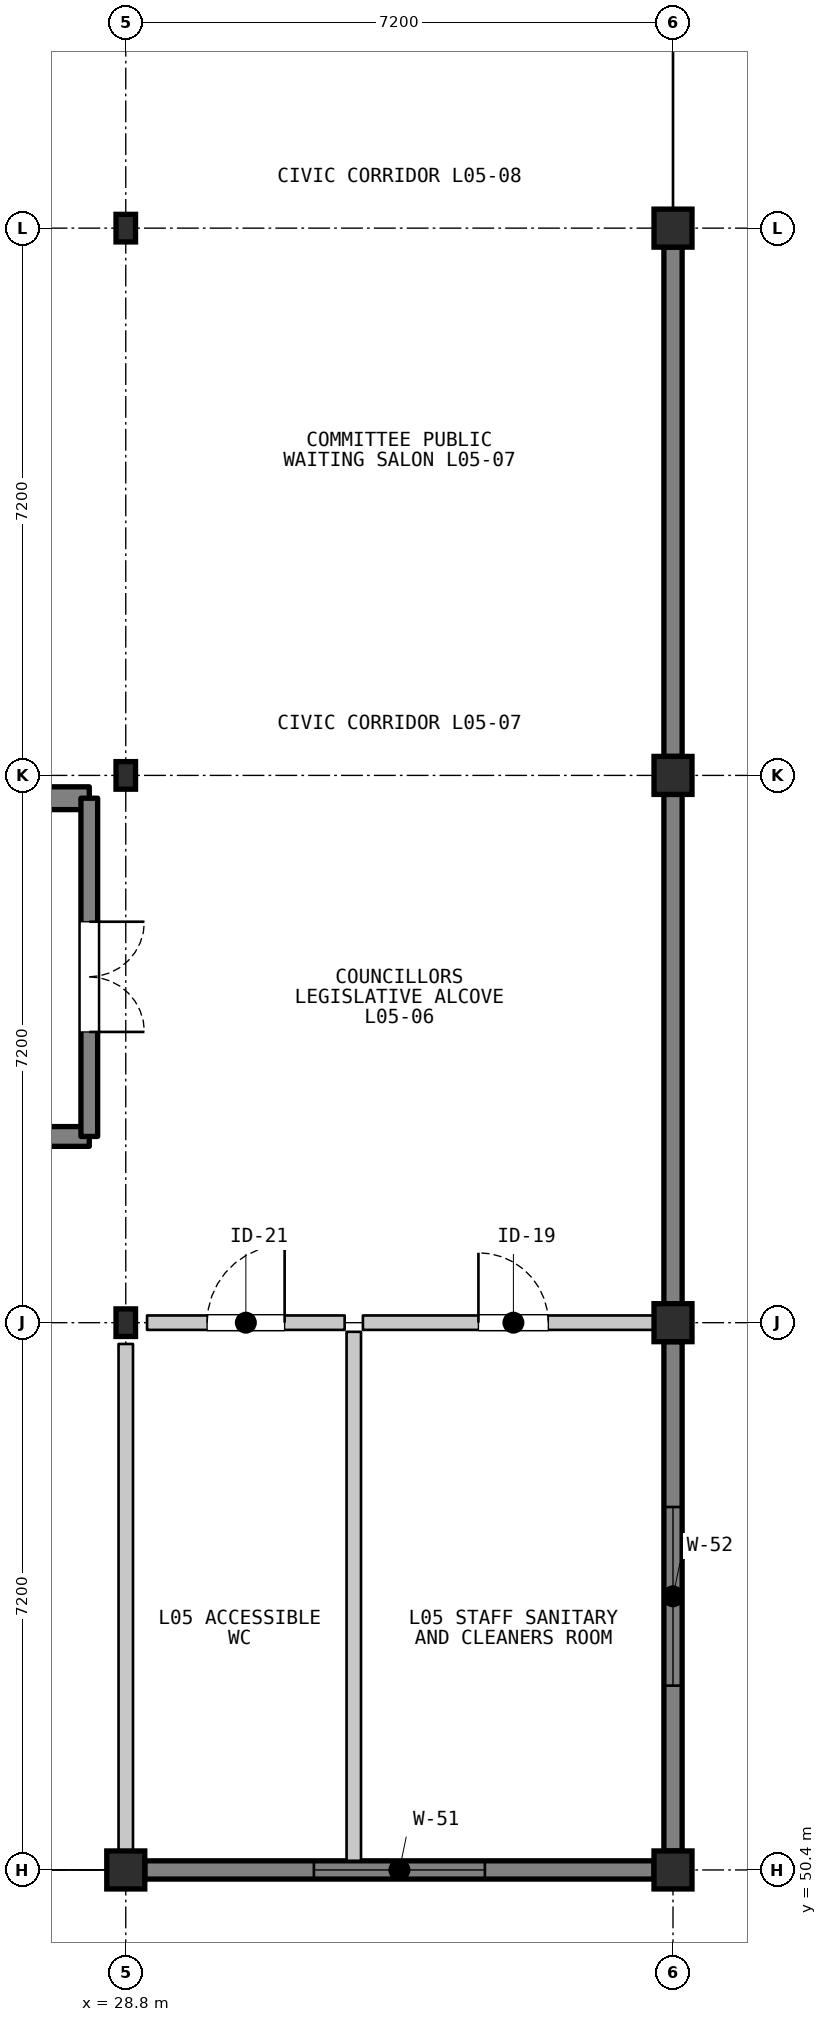
"""IFC4 building model, lengths in metres.
Left out: names, types, materials, properties, quantities, classifications, styles, units other than length and angle.
Written with IfcOpenShell. Run it as: python <this file> out.ifc"""

import sys

from ifc_helpers import new_model, si_unit, direction, frame, frame_2d, origin, origin_2d, place, context, subcontext, project, spatial, rectangle, i_section, extrude, element, fill, save


model = new_model("IFC4")
c1 = context("Model", 3, precision=1e-05, world=origin(), true_north=direction((0.0, 1.0)))
c2 = subcontext(c1, "Body", "Model", "MODEL_VIEW")
j1 = project(units=[si_unit("LENGTHUNIT", "METRE"), si_unit("PLANEANGLEUNIT", "RADIAN")], contexts=[c1])
p1 = place(None, origin())
s1 = spatial("IfcSite", under=j1, at=p1, CompositionType="ELEMENT")
p2 = place(p1, origin())
s2 = spatial("IfcBuilding", under=s1, at=p2, CompositionType="ELEMENT")
p3 = place(p2, frame((0.0, 0.0, 18.0)))
s3 = spatial("IfcBuildingStorey", under=s2, at=p3, CompositionType="ELEMENT", Elevation=18.0)
p4 = place(p3, frame((28.8, 50.4, 0.0), z_axis=(0.0, 0.0, 1.0), x_axis=(1.0, 0.0, 0.0)))
e1 = element("IfcColumn", 1, at=p4, inside=s3, PredefinedType="COLUMN", context=c2, shape_type="SweptSolid", body=[
    extrude(rectangle(XDim=0.5, YDim=0.5, at=origin_2d()), origin(), (0.0, 0.0, 1.0), 3.9),
])
for number, where, z_axis, x_axis in (
    (2, (28.8, 57.6, 0.0), (0.0, 0.0, 1.0), (1.0, 0.0, 0.0)),
    (3, (28.8, 64.8, 0.0), (0.0, 0.0, 1.0), (1.0, 0.0, 0.0)),
    (4, (28.8, 72.0, 0.0), (0.0, 0.0, 1.0), (1.0, 0.0, 0.0)),
):
    element("IfcColumn", number, at=place(p3, frame(where, z_axis=z_axis, x_axis=x_axis)), inside=s3, PredefinedType="COLUMN", context=c2, shape_type="SweptSolid", body=[
        extrude(i_section(OverallWidth=0.257, OverallDepth=0.363, WebThickness=0.013, FlangeThickness=0.022, FilletRadius=0.015, at=origin_2d()), origin(), (0.0, 0.0, 1.0), 3.9),
    ])
for number, where, z_axis, x_axis in (
    (5, (36.0, 50.4, 0.0), (0.0, 0.0, 1.0), (1.0, 0.0, 0.0)),
    (6, (36.0, 57.6, 0.0), (0.0, 0.0, 1.0), (1.0, 0.0, 0.0)),
    (7, (36.0, 64.8, 0.0), (0.0, 0.0, 1.0), (1.0, 0.0, 0.0)),
    (8, (36.0, 72.0, 0.0), (0.0, 0.0, 1.0), (1.0, 0.0, 0.0)),
):
    element("IfcColumn", number, at=place(p3, frame(where, z_axis=z_axis, x_axis=x_axis)), inside=s3, PredefinedType="COLUMN", context=c2, shape_type="SweptSolid", body=[
        extrude(rectangle(XDim=0.5, YDim=0.5, at=origin_2d()), origin(), (0.0, 0.0, 1.0), 3.9),
    ])
p5 = place(p3, frame((35.75, 50.4, 0.0), z_axis=(0.0, 0.0, 1.0), x_axis=(-1.0, 0.0, 0.0)))
e9 = element("IfcWall", 9, at=p5, inside=s3, PredefinedType="SOLIDWALL", context=c2, shape_type="SweptSolid", body=[
    extrude(rectangle(XDim=6.7, YDim=0.24, at=frame_2d((3.35, 0.0))), origin(), (0.0, 0.0, 1.0), 3.172),
])
p6 = place(p5, frame((2.225, 0.0, 0.95)))
e10 = element("IfcOpeningElement", 10, at=p6, cuts=e9, PredefinedType="OPENING", context=c2, shape_type="SweptSolid", body=[
    extrude(rectangle(XDim=2.25, YDim=1.65, at=frame_2d((1.125, 0.825))), frame((0.0, 0.13, 0.0), z_axis=(0.0, -1.0, 0.0), x_axis=(1.0, 0.0, 0.0)), (0.0, 0.0, 1.0), 0.26),
])
p7 = place(p3, frame((36.0, 57.35, 0.0), z_axis=(0.0, 0.0, 1.0), x_axis=(0.0, -1.0, 0.0)))
e11 = element("IfcWall", 11, at=p7, inside=s3, PredefinedType="SOLIDWALL", context=c2, shape_type="SweptSolid", body=[
    extrude(rectangle(XDim=6.7, YDim=0.24, at=frame_2d((3.35, 0.0))), origin(), (0.0, 0.0, 1.0), 3.172),
])
p8 = place(p7, frame((2.175, 0.0, 0.95)))
e12 = element("IfcOpeningElement", 12, at=p8, cuts=e11, PredefinedType="OPENING", context=c2, shape_type="SweptSolid", body=[
    extrude(rectangle(XDim=2.35, YDim=1.65, at=frame_2d((1.175, 0.825))), frame((0.0, 0.13, 0.0), z_axis=(0.0, -1.0, 0.0), x_axis=(1.0, 0.0, 0.0)), (0.0, 0.0, 1.0), 0.26),
])
for number, where, z_axis, x_axis in (
    (13, (36.0, 64.55, 0.0), (0.0, 0.0, 1.0), (0.0, -1.0, 0.0)),
    (14, (36.0, 71.75, 0.0), (0.0, 0.0, 1.0), (0.0, -1.0, 0.0)),
):
    element("IfcWall", number, at=place(p3, frame(where, z_axis=z_axis, x_axis=x_axis)), inside=s3, PredefinedType="SOLIDWALL", context=c2, shape_type="SweptSolid", body=[
        extrude(rectangle(XDim=6.7, YDim=0.24, at=frame_2d((3.35, 0.0))), origin(), (0.0, 0.0, 1.0), 3.172),
    ])
p9 = place(p3, frame((22.91, 60.05, 0.0), z_axis=(0.0, 0.0, 1.0), x_axis=(1.0, 0.0, 0.0)))
e15 = element("IfcWall", 15, at=p9, inside=s3, PredefinedType="SHEAR", context=c2, shape_type="SweptSolid", body=[
    extrude(rectangle(XDim=5.41, YDim=0.26, at=frame_2d((2.705, 0.0))), origin(), (0.0, 0.0, 1.0), 3.72),
])
p10 = place(p9, frame((2.84, 0.0, 0.0)))
e16 = element("IfcOpeningElement", 16, at=p10, cuts=e15, PredefinedType="OPENING", context=c2, shape_type="SweptSolid", body=[
    extrude(rectangle(XDim=1.15, YDim=2.15, at=frame_2d((0.575, 1.075))), frame((0.0, 0.14, 0.0), z_axis=(0.0, -1.0, 0.0), x_axis=(1.0, 0.0, 0.0)), (0.0, 0.0, 1.0), 0.28),
])
p11 = place(p3, frame((22.4, 64.5, 0.0), z_axis=(0.0, 0.0, 1.0), x_axis=(1.0, 0.0, 0.0)))
e17 = element("IfcWall", 17, at=p11, inside=s3, PredefinedType="SHEAR", context=c2, shape_type="SweptSolid", body=[
    extrude(rectangle(XDim=5.92, YDim=0.3, at=frame_2d((2.96, 0.0))), origin(), (0.0, 0.0, 1.0), 3.72),
])
p12 = place(p3, frame((28.32, 64.5, 0.0), z_axis=(0.0, 0.0, 1.0), x_axis=(0.0, -1.0, 0.0)))
e18 = element("IfcWall", 18, at=p12, inside=s3, PredefinedType="SHEAR", context=c2, shape_type="SweptSolid", body=[
    extrude(rectangle(XDim=4.45, YDim=0.22, at=frame_2d((2.225, 0.0))), origin(), (0.0, 0.0, 1.0), 3.72),
])
p13 = place(p12, frame((1.625, 0.0, 0.0)))
e19 = element("IfcOpeningElement", 19, at=p13, cuts=e18, PredefinedType="OPENING", context=c2, shape_type="SweptSolid", body=[
    extrude(rectangle(XDim=1.45, YDim=2.2, at=frame_2d((0.725, 1.1))), frame((0.0, 0.12, 0.0), z_axis=(0.0, -1.0, 0.0), x_axis=(1.0, 0.0, 0.0)), (0.0, 0.0, 1.0), 0.24),
])
p14 = place(p3, frame((29.08, 57.6, 0.0), z_axis=(0.0, 0.0, 1.0), x_axis=(1.0, 0.0, 0.0)))
e20 = element("IfcWall", 20, at=p14, inside=s3, PredefinedType="PARTITIONING", context=c2, shape_type="SweptSolid", body=[
    extrude(rectangle(XDim=2.6, YDim=0.19, at=frame_2d((1.3, 0.0))), origin(), (0.0, 0.0, 1.0), 3.088),
])
p15 = place(p14, frame((0.79, 0.0, 0.0)))
e21 = element("IfcOpeningElement", 21, at=p15, cuts=e20, PredefinedType="OPENING", context=c2, shape_type="SweptSolid", body=[
    extrude(rectangle(XDim=1.02, YDim=2.15, at=frame_2d((0.51, 1.075))), frame((0.0, 0.105, 0.0), z_axis=(0.0, -1.0, 0.0), x_axis=(1.0, 0.0, 0.0)), (0.0, 0.0, 1.0), 0.21),
])
p16 = place(p3, frame((28.8, 50.52, 0.0), z_axis=(0.0, 0.0, 1.0), x_axis=(0.0, 1.0, 0.0)))
e22 = element("IfcWall", 22, at=p16, inside=s3, PredefinedType="PARTITIONING", context=c2, shape_type="SweptSolid", body=[
    extrude(rectangle(XDim=6.8, YDim=0.19, at=frame_2d((3.4, 0.0))), origin(), (0.0, 0.0, 1.0), 3.157),
])
p17 = place(p3, frame((31.8, 57.48, 0.0), z_axis=(0.0, 0.0, 1.0), x_axis=(0.0, -1.0, 0.0)))
e23 = element("IfcWall", 23, at=p17, inside=s3, PredefinedType="PARTITIONING", context=c2, shape_type="SweptSolid", body=[
    extrude(rectangle(XDim=6.96, YDim=0.19, at=frame_2d((3.48, 0.0))), origin(), (0.0, 0.0, 1.0), 3.088),
])
p18 = place(p3, frame((31.92, 57.6, 0.0), z_axis=(0.0, 0.0, 1.0), x_axis=(1.0, 0.0, 0.0)))
e24 = element("IfcWall", 24, at=p18, inside=s3, PredefinedType="PARTITIONING", context=c2, shape_type="SweptSolid", body=[
    extrude(rectangle(XDim=3.96, YDim=0.19, at=frame_2d((1.98, 0.0))), origin(), (0.0, 0.0, 1.0), 3.088),
])
p19 = place(p18, frame((1.52, 0.0, 0.0)))
e25 = element("IfcOpeningElement", 25, at=p19, cuts=e24, PredefinedType="OPENING", context=c2, shape_type="SweptSolid", body=[
    extrude(rectangle(XDim=0.92, YDim=2.1, at=frame_2d((0.46, 1.05))), frame((0.0, 0.105, 0.0), z_axis=(0.0, -1.0, 0.0), x_axis=(1.0, 0.0, 0.0)), (0.0, 0.0, 1.0), 0.21),
])
p20 = place(p6, origin())
e26 = element("IfcWindow", 26, at=p20, inside=s3, PartitioningType="SINGLE_PANEL", PredefinedType="WINDOW", context=c2, shape_type="SweptSolid", body=[
    extrude(rectangle(XDim=2.25, YDim=1.65, at=frame_2d((1.125, 0.825))), frame((0.0, 0.03, 0.0), z_axis=(0.0, -1.0, 0.0), x_axis=(1.0, 0.0, 0.0)), (0.0, 0.0, 1.0), 0.06),
])
fill(e10, e26)
p21 = place(p8, origin())
e27 = element("IfcWindow", 27, at=p21, inside=s3, PartitioningType="SINGLE_PANEL", PredefinedType="WINDOW", context=c2, shape_type="SweptSolid", body=[
    extrude(rectangle(XDim=2.35, YDim=1.65, at=frame_2d((1.175, 0.825))), frame((0.0, 0.03, 0.0), z_axis=(0.0, -1.0, 0.0), x_axis=(1.0, 0.0, 0.0)), (0.0, 0.0, 1.0), 0.06),
])
fill(e12, e27)
p22 = place(p13, origin())
e28 = element("IfcDoor", 28, at=p22, inside=s3, OperationType="DOUBLE_DOOR_SINGLE_SWING", PredefinedType="DOOR", context=c2, shape_type="SweptSolid", body=[
    extrude(rectangle(XDim=1.45, YDim=2.2, at=frame_2d((0.725, 1.1))), frame((0.0, 0.025, 0.0), z_axis=(0.0, -1.0, 0.0), x_axis=(1.0, 0.0, 0.0)), (0.0, 0.0, 1.0), 0.05),
])
fill(e19, e28)
p23 = place(p15, origin())
e29 = element("IfcDoor", 29, at=p23, inside=s3, OperationType="SINGLE_SWING_RIGHT", PredefinedType="DOOR", context=c2, shape_type="SweptSolid", body=[
    extrude(rectangle(XDim=1.02, YDim=2.15, at=frame_2d((0.51, 1.075))), frame((0.0, 0.025, 0.0), z_axis=(0.0, -1.0, 0.0), x_axis=(1.0, 0.0, 0.0)), (0.0, 0.0, 1.0), 0.05),
])
fill(e21, e29)
p24 = place(p19, origin())
e30 = element("IfcDoor", 30, at=p24, inside=s3, OperationType="SINGLE_SWING_LEFT", PredefinedType="DOOR", context=c2, shape_type="SweptSolid", body=[
    extrude(rectangle(XDim=0.92, YDim=2.1, at=frame_2d((0.46, 1.05))), frame((0.0, 0.025, 0.0), z_axis=(0.0, -1.0, 0.0), x_axis=(1.0, 0.0, 0.0)), (0.0, 0.0, 1.0), 0.05),
])
fill(e25, e30)
save(model, sys.argv[1])
